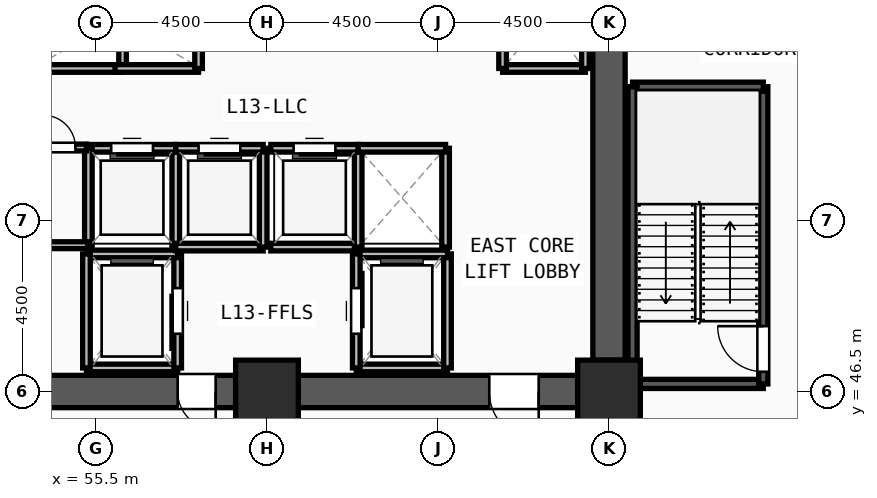
"""IFC4 building model, lengths in metres.
Left out: names, types, materials, properties, quantities, classifications, styles, units other than length and angle.
Written with IfcOpenShell. Run it as: python <this file> out.ifc"""

import sys

from ifc_helpers import new_model, si_unit, direction, frame, frame_2d, origin, origin_2d, place, context, subcontext, project, spatial, rectangle, extrude, source, transform, mapped, element, fill, save


model = new_model("IFC4")
c1 = context("Model", 3, precision=1e-05, world=origin(), true_north=direction((0.0, 1.0)))
c2 = subcontext(c1, "Body", "Model", "MODEL_VIEW")
j1 = project(units=[si_unit("LENGTHUNIT", "METRE"), si_unit("PLANEANGLEUNIT", "RADIAN")], contexts=[c1])
p1 = place(None, origin())
s1 = spatial("IfcSite", under=j1, at=p1, CompositionType="ELEMENT")
p2 = place(p1, origin())
s2 = spatial("IfcBuilding", under=s1, at=p2, CompositionType="ELEMENT")
p3 = place(p2, frame((0.0, 0.0, 51.75)))
s3 = spatial("IfcBuildingStorey", under=s2, at=p3, CompositionType="ELEMENT", Elevation=51.75)
m1 = source(origin(), c2, "Body", "SweptSolid", [
    extrude(rectangle(XDim=1.65, YDim=1.65, at=origin_2d()), origin(), (0.0, 0.0, 1.0), 3.75),
])
for number, where, z_axis, x_axis in (
    (1, (60.0, 46.5, 0.0), (0.0, 0.0, 1.0), (1.0, 0.0, 0.0)),
    (2, (69.0, 46.5, 0.0), (0.0, 0.0, 1.0), (1.0, 0.0, 0.0)),
):
    element("IfcColumn", number, at=place(p3, frame(where, z_axis=z_axis, x_axis=x_axis)), inside=s3, PredefinedType="COLUMN", context=c2, shape_type="MappedRepresentation", body=[
        mapped(m1, transform((0.0, 0.0, 0.0), x_axis=(1.0, 0.0, 0.0), y_axis=(0.0, 1.0, 0.0), z_axis=(0.0, 0.0, 1.0), scale=1.0)),
    ])
p4 = place(p3, frame((69.0, 60.675, 0.0), z_axis=(0.0, 0.0, 1.0), x_axis=(0.0, -1.0, 0.0)))
e3 = element("IfcWall", 3, at=p4, inside=s3, PredefinedType="SHEAR", context=c2, shape_type="SweptSolid", body=[
    extrude(rectangle(XDim=13.35, YDim=0.85, at=frame_2d((6.675, 0.0))), origin(), (0.0, 0.0, 1.0), 3.57),
])
m2 = source(origin(), c2, "Body", "SweptSolid", [
    extrude(rectangle(XDim=1.2, YDim=2.2, at=frame_2d((0.6, 1.1))), frame((0.0, 0.435, 0.0), z_axis=(0.0, -1.0, 0.0), x_axis=(1.0, 0.0, 0.0)), (0.0, 0.0, 1.0), 0.87),
])
p5 = place(p4, frame((1.125, 0.0, 0.0)))
e4 = element("IfcOpeningElement", 4, at=p5, cuts=e3, PredefinedType="OPENING", context=c2, shape_type="MappedRepresentation", body=[
    mapped(m2, transform((0.0, 0.0, 0.0), x_axis=(1.0, 0.0, 0.0), y_axis=(0.0, 1.0, 0.0), z_axis=(0.0, 0.0, 1.0), scale=1.0)),
])
p6 = place(p3, frame((68.175, 46.5, 0.0), z_axis=(0.0, 0.0, 1.0), x_axis=(-1.0, 0.0, 0.0)))
e5 = element("IfcWall", 5, at=p6, inside=s3, PredefinedType="SHEAR", context=c2, shape_type="SweptSolid", body=[
    extrude(rectangle(XDim=7.35, YDim=0.85, at=frame_2d((3.675, 0.0))), origin(), (0.0, 0.0, 1.0), 3.57),
])
m3 = source(origin(), c2, "Body", "SweptSolid", [
    extrude(rectangle(XDim=1.3, YDim=2.2, at=frame_2d((0.65, 1.1))), frame((0.0, 0.435, 0.0), z_axis=(0.0, -1.0, 0.0), x_axis=(1.0, 0.0, 0.0)), (0.0, 0.0, 1.0), 0.87),
])
p7 = place(p6, frame((1.025, 0.0, 0.0)))
e6 = element("IfcOpeningElement", 6, at=p7, cuts=e5, PredefinedType="OPENING", context=c2, shape_type="MappedRepresentation", body=[
    mapped(m3, transform((0.0, 0.0, 0.0), x_axis=(1.0, 0.0, 0.0), y_axis=(0.0, 1.0, 0.0), z_axis=(0.0, 0.0, 1.0), scale=1.0)),
])
p8 = place(p3, frame((59.175, 46.5, 0.0), z_axis=(0.0, 0.0, 1.0), x_axis=(-1.0, 0.0, 0.0)))
e7 = element("IfcWall", 7, at=p8, inside=s3, PredefinedType="SHEAR", context=c2, shape_type="SweptSolid", body=[
    extrude(rectangle(XDim=7.35, YDim=0.85, at=frame_2d((3.675, 0.0))), origin(), (0.0, 0.0, 1.0), 3.57),
])
p9 = place(p8, frame((5.025, 0.0, 0.0)))
e8 = element("IfcOpeningElement", 8, at=p9, cuts=e7, PredefinedType="OPENING", context=c2, shape_type="MappedRepresentation", body=[
    mapped(m3, transform((0.0, 0.0, 0.0), x_axis=(1.0, 0.0, 0.0), y_axis=(0.0, 1.0, 0.0), z_axis=(0.0, 0.0, 1.0), scale=1.0)),
])
m4 = source(origin(), c2, "Body", "SweptSolid", [
    extrude(rectangle(XDim=1.0, YDim=2.2, at=frame_2d((0.5, 1.1))), frame((0.0, 0.435, 0.0), z_axis=(0.0, -1.0, 0.0), x_axis=(1.0, 0.0, 0.0)), (0.0, 0.0, 1.0), 0.87),
])
p10 = place(p8, frame((0.525, 0.0, 0.0)))
e9 = element("IfcOpeningElement", 9, at=p10, cuts=e7, PredefinedType="OPENING", context=c2, shape_type="MappedRepresentation", body=[
    mapped(m4, transform((0.0, 0.0, 0.0), x_axis=(1.0, 0.0, 0.0), y_axis=(0.0, 1.0, 0.0), z_axis=(0.0, 0.0, 1.0), scale=1.0)),
])
p11 = place(p3, frame((69.62, 46.7, 0.0), z_axis=(0.0, 0.0, 1.0), x_axis=(1.0, 0.0, 0.0)))
e10 = element("IfcWall", 10, at=p11, inside=s3, PredefinedType="SOLIDWALL", context=c2, shape_type="SweptSolid", body=[
    extrude(rectangle(XDim=3.44, YDim=0.24, at=frame_2d((1.72, 0.0))), origin(), (0.0, 0.0, 1.0), 3.57),
])
p12 = place(p3, frame((73.06, 46.7, 0.0), z_axis=(0.0, 0.0, 1.0), x_axis=(0.0, 1.0, 0.0)))
e11 = element("IfcWall", 11, at=p12, inside=s3, PredefinedType="SOLIDWALL", context=c2, shape_type="SweptSolid", body=[
    extrude(rectangle(XDim=7.82, YDim=0.24, at=frame_2d((3.91, 0.0))), origin(), (0.0, 0.0, 1.0), 3.57),
])
m5 = source(origin(), c2, "Body", "SweptSolid", [
    extrude(rectangle(XDim=1.2, YDim=2.2, at=frame_2d((0.6, 1.1))), frame((0.0, 0.13, 0.0), z_axis=(0.0, -1.0, 0.0), x_axis=(1.0, 0.0, 0.0)), (0.0, 0.0, 1.0), 0.26),
])
p13 = place(p12, frame((0.32, 0.0, 0.0)))
e12 = element("IfcOpeningElement", 12, at=p13, cuts=e11, PredefinedType="OPENING", context=c2, shape_type="MappedRepresentation", body=[
    mapped(m5, transform((0.0, 0.0, 0.0), x_axis=(1.0, 0.0, 0.0), y_axis=(0.0, 1.0, 0.0), z_axis=(0.0, 0.0, 1.0), scale=1.0)),
])
p14 = place(p3, frame((73.06, 54.52, 0.0), z_axis=(0.0, 0.0, 1.0), x_axis=(-1.0, 0.0, 0.0)))
e13 = element("IfcWall", 13, at=p14, inside=s3, PredefinedType="SOLIDWALL", context=c2, shape_type="SweptSolid", body=[
    extrude(rectangle(XDim=3.44, YDim=0.24, at=frame_2d((1.72, 0.0))), origin(), (0.0, 0.0, 1.0), 3.57),
])
p15 = place(p3, frame((69.62, 54.52, 0.0), z_axis=(0.0, 0.0, 1.0), x_axis=(0.0, -1.0, 0.0)))
e14 = element("IfcWall", 14, at=p15, inside=s3, PredefinedType="SOLIDWALL", context=c2, shape_type="SweptSolid", body=[
    extrude(rectangle(XDim=7.82, YDim=0.24, at=frame_2d((3.91, 0.0))), origin(), (0.0, 0.0, 1.0), 3.57),
])
p16 = place(p3, frame((55.25, 47.12, 0.0), z_axis=(0.0, 0.0, 1.0), x_axis=(1.0, 0.0, 0.0)))
e15 = element("IfcWall", 15, at=p16, inside=s3, PredefinedType="SOLIDWALL", context=c2, shape_type="SweptSolid", body=[
    extrude(rectangle(XDim=2.4, YDim=0.2, at=frame_2d((1.2, 0.0))), origin(), (0.0, 0.0, 1.0), 3.57),
])
p17 = place(p3, frame((57.65, 47.12, 0.0), z_axis=(0.0, 0.0, 1.0), x_axis=(0.0, 1.0, 0.0)))
e16 = element("IfcWall", 16, at=p17, inside=s3, PredefinedType="SOLIDWALL", context=c2, shape_type="SweptSolid", body=[
    extrude(rectangle(XDim=3.0, YDim=0.2, at=frame_2d((1.5, 0.0))), origin(), (0.0, 0.0, 1.0), 3.57),
])
m6 = source(origin(), c2, "Body", "SweptSolid", [
    extrude(rectangle(XDim=1.2, YDim=2.3, at=frame_2d((0.6, 1.15))), frame((0.0, 0.11, 0.0), z_axis=(0.0, -1.0, 0.0), x_axis=(1.0, 0.0, 0.0)), (0.0, 0.0, 1.0), 0.22),
])
p18 = place(p17, frame((0.9, 0.0, 0.0)))
e17 = element("IfcOpeningElement", 17, at=p18, cuts=e16, PredefinedType="OPENING", context=c2, shape_type="MappedRepresentation", body=[
    mapped(m6, transform((0.0, 0.0, 0.0), x_axis=(1.0, 0.0, 0.0), y_axis=(0.0, 1.0, 0.0), z_axis=(0.0, 0.0, 1.0), scale=1.0)),
])
p19 = place(p3, frame((57.65, 50.12, 0.0), z_axis=(0.0, 0.0, 1.0), x_axis=(-1.0, 0.0, 0.0)))
e18 = element("IfcWall", 18, at=p19, inside=s3, PredefinedType="SOLIDWALL", context=c2, shape_type="SweptSolid", body=[
    extrude(rectangle(XDim=2.4, YDim=0.2, at=frame_2d((1.2, 0.0))), origin(), (0.0, 0.0, 1.0), 3.57),
])
p20 = place(p3, frame((55.25, 50.12, 0.0), z_axis=(0.0, 0.0, 1.0), x_axis=(0.0, -1.0, 0.0)))
e19 = element("IfcWall", 19, at=p20, inside=s3, PredefinedType="SOLIDWALL", context=c2, shape_type="SweptSolid", body=[
    extrude(rectangle(XDim=3.0, YDim=0.2, at=frame_2d((1.5, 0.0))), origin(), (0.0, 0.0, 1.0), 3.57),
])
p21 = place(p3, frame((62.35, 47.12, 0.0), z_axis=(0.0, 0.0, 1.0), x_axis=(1.0, 0.0, 0.0)))
e20 = element("IfcWall", 20, at=p21, inside=s3, PredefinedType="SOLIDWALL", context=c2, shape_type="SweptSolid", body=[
    extrude(rectangle(XDim=2.4, YDim=0.2, at=frame_2d((1.2, 0.0))), origin(), (0.0, 0.0, 1.0), 3.57),
])
p22 = place(p3, frame((64.75, 47.12, 0.0), z_axis=(0.0, 0.0, 1.0), x_axis=(0.0, 1.0, 0.0)))
e21 = element("IfcWall", 21, at=p22, inside=s3, PredefinedType="SOLIDWALL", context=c2, shape_type="SweptSolid", body=[
    extrude(rectangle(XDim=3.0, YDim=0.2, at=frame_2d((1.5, 0.0))), origin(), (0.0, 0.0, 1.0), 3.57),
])
p23 = place(p3, frame((64.75, 50.12, 0.0), z_axis=(0.0, 0.0, 1.0), x_axis=(-1.0, 0.0, 0.0)))
e22 = element("IfcWall", 22, at=p23, inside=s3, PredefinedType="SOLIDWALL", context=c2, shape_type="SweptSolid", body=[
    extrude(rectangle(XDim=2.4, YDim=0.2, at=frame_2d((1.2, 0.0))), origin(), (0.0, 0.0, 1.0), 3.57),
])
p24 = place(p3, frame((62.35, 50.12, 0.0), z_axis=(0.0, 0.0, 1.0), x_axis=(0.0, -1.0, 0.0)))
e23 = element("IfcWall", 23, at=p24, inside=s3, PredefinedType="SOLIDWALL", context=c2, shape_type="SweptSolid", body=[
    extrude(rectangle(XDim=3.0, YDim=0.2, at=frame_2d((1.5, 0.0))), origin(), (0.0, 0.0, 1.0), 3.57),
])
p25 = place(p24, frame((0.9, 0.0, 0.0)))
e24 = element("IfcOpeningElement", 24, at=p25, cuts=e23, PredefinedType="OPENING", context=c2, shape_type="MappedRepresentation", body=[
    mapped(m6, transform((0.0, 0.0, 0.0), x_axis=(1.0, 0.0, 0.0), y_axis=(0.0, 1.0, 0.0), z_axis=(0.0, 0.0, 1.0), scale=1.0)),
])
p26 = place(p3, frame((66.2, 55.0, 0.0), z_axis=(0.0, 0.0, 1.0), x_axis=(1.0, 0.0, 0.0)))
e25 = element("IfcWall", 25, at=p26, inside=s3, PredefinedType="SOLIDWALL", context=c2, shape_type="SweptSolid", body=[
    extrude(rectangle(XDim=2.18, YDim=0.2, at=frame_2d((1.09, 0.0))), origin(), (0.0, 0.0, 1.0), 3.57),
])
for number, where, z_axis, x_axis in (
    (26, (68.38, 55.0, 0.0), (0.0, 0.0, 1.0), (0.0, 1.0, 0.0)),
    (27, (66.2, 57.75, 0.0), (0.0, 0.0, 1.0), (0.0, -1.0, 0.0)),
):
    element("IfcWall", number, at=place(p3, frame(where, z_axis=z_axis, x_axis=x_axis)), inside=s3, PredefinedType="SOLIDWALL", context=c2, shape_type="SweptSolid", body=[
        extrude(rectangle(XDim=2.75, YDim=0.2, at=frame_2d((1.375, 0.0))), origin(), (0.0, 0.0, 1.0), 3.57),
    ])
p27 = place(p3, frame((57.6, 50.3, 0.0), z_axis=(0.0, 0.0, 1.0), x_axis=(0.0, 1.0, 0.0)))
e28 = element("IfcWall", 28, at=p27, inside=s3, PredefinedType="SOLIDWALL", context=c2, shape_type="SweptSolid", body=[
    extrude(rectangle(XDim=2.6, YDim=0.2, at=frame_2d((1.3, 0.0))), origin(), (0.0, 0.0, 1.0), 3.57),
])
p28 = place(p3, frame((57.6, 52.9, 0.0), z_axis=(0.0, 0.0, 1.0), x_axis=(-1.0, 0.0, 0.0)))
e29 = element("IfcWall", 29, at=p28, inside=s3, PredefinedType="SOLIDWALL", context=c2, shape_type="SweptSolid", body=[
    extrude(rectangle(XDim=2.3, YDim=0.2, at=frame_2d((1.15, 0.0))), origin(), (0.0, 0.0, 1.0), 3.57),
])
m7 = source(origin(), c2, "Body", "SweptSolid", [
    extrude(rectangle(XDim=1.1, YDim=2.2, at=frame_2d((0.55, 1.1))), frame((0.0, 0.11, 0.0), z_axis=(0.0, -1.0, 0.0), x_axis=(1.0, 0.0, 0.0)), (0.0, 0.0, 1.0), 0.22),
])
p29 = place(p28, frame((0.6, 0.0, 0.0)))
e30 = element("IfcOpeningElement", 30, at=p29, cuts=e29, PredefinedType="OPENING", context=c2, shape_type="MappedRepresentation", body=[
    mapped(m7, transform((0.0, 0.0, 0.0), x_axis=(1.0, 0.0, 0.0), y_axis=(0.0, 1.0, 0.0), z_axis=(0.0, 0.0, 1.0), scale=1.0)),
])
p30 = place(p3, frame((55.3, 52.9, 0.0), z_axis=(0.0, 0.0, 1.0), x_axis=(0.0, -1.0, 0.0)))
e31 = element("IfcWall", 31, at=p30, inside=s3, PredefinedType="SOLIDWALL", context=c2, shape_type="SweptSolid", body=[
    extrude(rectangle(XDim=2.6, YDim=0.2, at=frame_2d((1.3, 0.0))), origin(), (0.0, 0.0, 1.0), 3.57),
])
p31 = place(p3, frame((57.6, 50.3, 0.0), z_axis=(0.0, 0.0, 1.0), x_axis=(1.0, 0.0, 0.0)))
e32 = element("IfcWall", 32, at=p31, inside=s3, PredefinedType="SOLIDWALL", context=c2, shape_type="SweptSolid", body=[
    extrude(rectangle(XDim=2.3, YDim=0.2, at=frame_2d((1.15, 0.0))), origin(), (0.0, 0.0, 1.0), 3.57),
])
p32 = place(p3, frame((59.9, 50.3, 0.0), z_axis=(0.0, 0.0, 1.0), x_axis=(0.0, 1.0, 0.0)))
e33 = element("IfcWall", 33, at=p32, inside=s3, PredefinedType="SOLIDWALL", context=c2, shape_type="SweptSolid", body=[
    extrude(rectangle(XDim=2.6, YDim=0.2, at=frame_2d((1.3, 0.0))), origin(), (0.0, 0.0, 1.0), 3.57),
])
p33 = place(p3, frame((59.9, 52.9, 0.0), z_axis=(0.0, 0.0, 1.0), x_axis=(-1.0, 0.0, 0.0)))
e34 = element("IfcWall", 34, at=p33, inside=s3, PredefinedType="SOLIDWALL", context=c2, shape_type="SweptSolid", body=[
    extrude(rectangle(XDim=2.3, YDim=0.2, at=frame_2d((1.15, 0.0))), origin(), (0.0, 0.0, 1.0), 3.57),
])
p34 = place(p33, frame((0.6, 0.0, 0.0)))
e35 = element("IfcOpeningElement", 35, at=p34, cuts=e34, PredefinedType="OPENING", context=c2, shape_type="MappedRepresentation", body=[
    mapped(m7, transform((0.0, 0.0, 0.0), x_axis=(1.0, 0.0, 0.0), y_axis=(0.0, 1.0, 0.0), z_axis=(0.0, 0.0, 1.0), scale=1.0)),
])
p35 = place(p3, frame((60.1, 50.3, 0.0), z_axis=(0.0, 0.0, 1.0), x_axis=(1.0, 0.0, 0.0)))
e36 = element("IfcWall", 36, at=p35, inside=s3, PredefinedType="SOLIDWALL", context=c2, shape_type="SweptSolid", body=[
    extrude(rectangle(XDim=2.3, YDim=0.2, at=frame_2d((1.15, 0.0))), origin(), (0.0, 0.0, 1.0), 3.57),
])
p36 = place(p3, frame((62.4, 50.3, 0.0), z_axis=(0.0, 0.0, 1.0), x_axis=(0.0, 1.0, 0.0)))
e37 = element("IfcWall", 37, at=p36, inside=s3, PredefinedType="SOLIDWALL", context=c2, shape_type="SweptSolid", body=[
    extrude(rectangle(XDim=2.6, YDim=0.2, at=frame_2d((1.3, 0.0))), origin(), (0.0, 0.0, 1.0), 3.57),
])
p37 = place(p3, frame((62.4, 52.9, 0.0), z_axis=(0.0, 0.0, 1.0), x_axis=(-1.0, 0.0, 0.0)))
e38 = element("IfcWall", 38, at=p37, inside=s3, PredefinedType="SOLIDWALL", context=c2, shape_type="SweptSolid", body=[
    extrude(rectangle(XDim=2.3, YDim=0.2, at=frame_2d((1.15, 0.0))), origin(), (0.0, 0.0, 1.0), 3.57),
])
p38 = place(p37, frame((0.6, 0.0, 0.0)))
e39 = element("IfcOpeningElement", 39, at=p38, cuts=e38, PredefinedType="OPENING", context=c2, shape_type="MappedRepresentation", body=[
    mapped(m7, transform((0.0, 0.0, 0.0), x_axis=(1.0, 0.0, 0.0), y_axis=(0.0, 1.0, 0.0), z_axis=(0.0, 0.0, 1.0), scale=1.0)),
])
p39 = place(p3, frame((64.7, 50.3, 0.0), z_axis=(0.0, 0.0, 1.0), x_axis=(0.0, 1.0, 0.0)))
e40 = element("IfcWall", 40, at=p39, inside=s3, PredefinedType="SOLIDWALL", context=c2, shape_type="SweptSolid", body=[
    extrude(rectangle(XDim=2.6, YDim=0.2, at=frame_2d((1.3, 0.0))), origin(), (0.0, 0.0, 1.0), 3.57),
])
for number, where, z_axis, x_axis in (
    (41, (64.7, 52.9, 0.0), (0.0, 0.0, 1.0), (-1.0, 0.0, 0.0)),
    (42, (53.9, 55.0, 0.0), (0.0, 0.0, 1.0), (1.0, 0.0, 0.0)),
):
    element("IfcWall", number, at=place(p3, frame(where, z_axis=z_axis, x_axis=x_axis)), inside=s3, PredefinedType="SOLIDWALL", context=c2, shape_type="SweptSolid", body=[
        extrude(rectangle(XDim=2.3, YDim=0.2, at=frame_2d((1.15, 0.0))), origin(), (0.0, 0.0, 1.0), 3.57),
    ])
p40 = place(p3, frame((56.2, 55.0, 0.0), z_axis=(0.0, 0.0, 1.0), x_axis=(0.0, 1.0, 0.0)))
e43 = element("IfcWall", 43, at=p40, inside=s3, PredefinedType="SOLIDWALL", context=c2, shape_type="SweptSolid", body=[
    extrude(rectangle(XDim=2.6, YDim=0.2, at=frame_2d((1.3, 0.0))), origin(), (0.0, 0.0, 1.0), 3.57),
])
p41 = place(p3, frame((56.0, 55.0, 0.0), z_axis=(0.0, 0.0, 1.0), x_axis=(1.0, 0.0, 0.0)))
e44 = element("IfcWall", 44, at=p41, inside=s3, PredefinedType="SOLIDWALL", context=c2, shape_type="SweptSolid", body=[
    extrude(rectangle(XDim=2.2, YDim=0.2, at=frame_2d((1.1, 0.0))), origin(), (0.0, 0.0, 1.0), 3.57),
])
p42 = place(p3, frame((58.2, 55.0, 0.0), z_axis=(0.0, 0.0, 1.0), x_axis=(0.0, 1.0, 0.0)))
e45 = element("IfcWall", 45, at=p42, inside=s3, PredefinedType="SOLIDWALL", context=c2, shape_type="SweptSolid", body=[
    extrude(rectangle(XDim=2.6, YDim=0.2, at=frame_2d((1.3, 0.0))), origin(), (0.0, 0.0, 1.0), 3.57),
])
p43 = place(p3, frame((53.82, 52.92, 0.0), z_axis=(0.0, 0.0, 1.0), x_axis=(1.0, 0.0, 0.0)))
e46 = element("IfcWall", 46, at=p43, inside=s3, PredefinedType="PARTITIONING", context=c2, shape_type="SweptSolid", body=[
    extrude(rectangle(XDim=1.43, YDim=0.18, at=frame_2d((0.715, 0.0))), origin(), (0.0, 0.0, 1.0), 3.57),
])
m8 = source(origin(), c2, "Body", "SweptSolid", [
    extrude(rectangle(XDim=0.85, YDim=2.1, at=frame_2d((0.425, 1.05))), frame((0.0, 0.1, 0.0), z_axis=(0.0, -1.0, 0.0), x_axis=(1.0, 0.0, 0.0)), (0.0, 0.0, 1.0), 0.2),
])
p44 = place(p43, frame((0.29, 0.0, 0.0)))
e47 = element("IfcOpeningElement", 47, at=p44, cuts=e46, PredefinedType="OPENING", context=c2, shape_type="MappedRepresentation", body=[
    mapped(m8, transform((0.0, 0.0, 0.0), x_axis=(1.0, 0.0, 0.0), y_axis=(0.0, 1.0, 0.0), z_axis=(0.0, 0.0, 1.0), scale=1.0)),
])
p45 = place(p3, frame((53.79, 50.35, 0.0), z_axis=(0.0, 0.0, 1.0), x_axis=(1.0, 0.0, 0.0)))
e48 = element("IfcWall", 48, at=p45, inside=s3, PredefinedType="PARTITIONING", context=c2, shape_type="SweptSolid", body=[
    extrude(rectangle(XDim=1.49, YDim=0.18, at=frame_2d((0.745, 0.0))), origin(), (0.0, 0.0, 1.0), 3.57),
])
m9 = source(origin(), c2, "Body", "SweptSolid", [
    extrude(rectangle(XDim=1.0, YDim=2.2, at=frame_2d((0.5, 1.1))), frame((0.0, 0.025, 0.0), z_axis=(0.0, -1.0, 0.0), x_axis=(1.0, 0.0, 0.0)), (0.0, 0.0, 1.0), 0.05),
])
p46 = place(p10, origin())
e49 = element("IfcDoor", 49, at=p46, inside=s3, OperationType="SINGLE_SWING_LEFT", PredefinedType="DOOR", context=c2, shape_type="MappedRepresentation", body=[
    mapped(m9, transform((0.0, 0.0, 0.0), x_axis=(1.0, 0.0, 0.0), y_axis=(0.0, 1.0, 0.0), z_axis=(0.0, 0.0, 1.0), scale=1.0)),
])
fill(e9, e49)
m10 = source(origin(), c2, "Body", "SweptSolid", [
    extrude(rectangle(XDim=1.3, YDim=2.2, at=frame_2d((0.65, 1.1))), frame((0.0, 0.025, 0.0), z_axis=(0.0, -1.0, 0.0), x_axis=(1.0, 0.0, 0.0)), (0.0, 0.0, 1.0), 0.05),
])
p47 = place(p7, origin())
e50 = element("IfcDoor", 50, at=p47, inside=s3, OperationType="SINGLE_SWING_LEFT", PredefinedType="DOOR", context=c2, shape_type="MappedRepresentation", body=[
    mapped(m10, transform((0.0, 0.0, 0.0), x_axis=(1.0, 0.0, 0.0), y_axis=(0.0, 1.0, 0.0), z_axis=(0.0, 0.0, 1.0), scale=1.0)),
])
fill(e6, e50)
m11 = source(origin(), c2, "Body", "SweptSolid", [
    extrude(rectangle(XDim=1.2, YDim=2.2, at=frame_2d((0.6, 1.1))), frame((0.0, 0.025, 0.0), z_axis=(0.0, -1.0, 0.0), x_axis=(1.0, 0.0, 0.0)), (0.0, 0.0, 1.0), 0.05),
])
p48 = place(p13, origin())
e51 = element("IfcDoor", 51, at=p48, inside=s3, OperationType="SINGLE_SWING_RIGHT", PredefinedType="DOOR", context=c2, shape_type="MappedRepresentation", body=[
    mapped(m11, transform((0.0, 0.0, 0.0), x_axis=(1.0, 0.0, 0.0), y_axis=(0.0, 1.0, 0.0), z_axis=(0.0, 0.0, 1.0), scale=1.0)),
])
fill(e12, e51)
m12 = source(origin(), c2, "Body", "SweptSolid", [
    extrude(rectangle(XDim=1.2, YDim=2.3, at=frame_2d((0.6, 1.15))), frame((0.0, 0.025, 0.0), z_axis=(0.0, -1.0, 0.0), x_axis=(1.0, 0.0, 0.0)), (0.0, 0.0, 1.0), 0.05),
])
p49 = place(p18, origin())
e52 = element("IfcDoor", 52, at=p49, inside=s3, OperationType="SLIDING_TO_LEFT", PredefinedType="DOOR", context=c2, shape_type="MappedRepresentation", body=[
    mapped(m12, transform((0.0, 0.0, 0.0), x_axis=(1.0, 0.0, 0.0), y_axis=(0.0, 1.0, 0.0), z_axis=(0.0, 0.0, 1.0), scale=1.0)),
])
fill(e17, e52)
p50 = place(p25, origin())
e53 = element("IfcDoor", 53, at=p50, inside=s3, OperationType="SLIDING_TO_LEFT", PredefinedType="DOOR", context=c2, shape_type="MappedRepresentation", body=[
    mapped(m12, transform((0.0, 0.0, 0.0), x_axis=(1.0, 0.0, 0.0), y_axis=(0.0, 1.0, 0.0), z_axis=(0.0, 0.0, 1.0), scale=1.0)),
])
fill(e24, e53)
m13 = source(origin(), c2, "Body", "SweptSolid", [
    extrude(rectangle(XDim=1.1, YDim=2.2, at=frame_2d((0.55, 1.1))), frame((0.0, 0.025, 0.0), z_axis=(0.0, -1.0, 0.0), x_axis=(1.0, 0.0, 0.0)), (0.0, 0.0, 1.0), 0.05),
])
p51 = place(p29, origin())
e54 = element("IfcDoor", 54, at=p51, inside=s3, OperationType="SLIDING_TO_LEFT", PredefinedType="DOOR", context=c2, shape_type="MappedRepresentation", body=[
    mapped(m13, transform((0.0, 0.0, 0.0), x_axis=(1.0, 0.0, 0.0), y_axis=(0.0, 1.0, 0.0), z_axis=(0.0, 0.0, 1.0), scale=1.0)),
])
fill(e30, e54)
p52 = place(p34, origin())
e55 = element("IfcDoor", 55, at=p52, inside=s3, OperationType="SLIDING_TO_LEFT", PredefinedType="DOOR", context=c2, shape_type="MappedRepresentation", body=[
    mapped(m13, transform((0.0, 0.0, 0.0), x_axis=(1.0, 0.0, 0.0), y_axis=(0.0, 1.0, 0.0), z_axis=(0.0, 0.0, 1.0), scale=1.0)),
])
fill(e35, e55)
p53 = place(p38, origin())
e56 = element("IfcDoor", 56, at=p53, inside=s3, OperationType="SLIDING_TO_LEFT", PredefinedType="DOOR", context=c2, shape_type="MappedRepresentation", body=[
    mapped(m13, transform((0.0, 0.0, 0.0), x_axis=(1.0, 0.0, 0.0), y_axis=(0.0, 1.0, 0.0), z_axis=(0.0, 0.0, 1.0), scale=1.0)),
])
fill(e39, e56)
m14 = source(origin(), c2, "Body", "SweptSolid", [
    extrude(rectangle(XDim=0.85, YDim=2.1, at=frame_2d((0.425, 1.05))), frame((0.0, 0.025, 0.0), z_axis=(0.0, -1.0, 0.0), x_axis=(1.0, 0.0, 0.0)), (0.0, 0.0, 1.0), 0.05),
])
p54 = place(p44, origin())
e57 = element("IfcDoor", 57, at=p54, inside=s3, OperationType="SINGLE_SWING_LEFT", PredefinedType="DOOR", context=c2, shape_type="MappedRepresentation", body=[
    mapped(m14, transform((0.0, 0.0, 0.0), x_axis=(1.0, 0.0, 0.0), y_axis=(0.0, 1.0, 0.0), z_axis=(0.0, 0.0, 1.0), scale=1.0)),
])
fill(e47, e57)
save(model, sys.argv[1])
